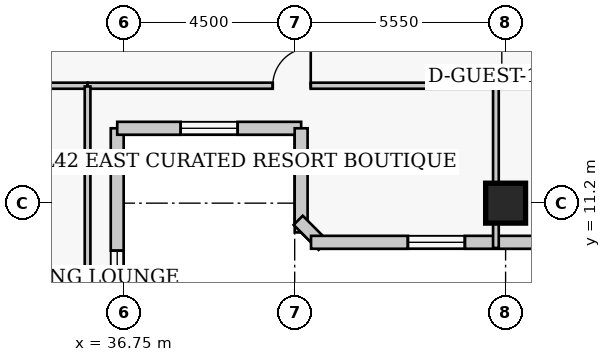
"""IFC4 building model, lengths in metres.
Left out: names, types, materials, properties, quantities, classifications, styles, units other than length and angle.
Written with IfcOpenShell. Run it as: python <this file> out.ifc"""

import sys

from ifc_helpers import new_model, si_unit, direction, frame, frame_2d, origin, origin_2d, place, context, subcontext, project, spatial, rectangle, extrude, element, fill, save


model = new_model("IFC4")
c1 = context("Model", 3, precision=1e-05, world=origin(), true_north=direction((0.0, 1.0)))
c2 = subcontext(c1, "Body", "Model", "MODEL_VIEW")
j1 = project(units=[si_unit("LENGTHUNIT", "METRE"), si_unit("PLANEANGLEUNIT", "RADIAN")], contexts=[c1])
p1 = place(None, origin())
s1 = spatial("IfcSite", under=j1, at=p1, CompositionType="ELEMENT")
p2 = place(p1, origin())
s2 = spatial("IfcBuilding", under=s1, at=p2, CompositionType="ELEMENT")
p3 = place(p2, frame((0.0, 0.0, 168.8)))
s3 = spatial("IfcBuildingStorey", under=s2, at=p3, CompositionType="ELEMENT", Elevation=168.8)
p4 = place(p3, frame((46.8, 11.2, 0.0), z_axis=(0.0, 0.0, 1.0), x_axis=(1.0, 0.0, 0.0)))
e1 = element("IfcColumn", 1, at=p4, inside=s3, PredefinedType="COLUMN", context=c2, shape_type="SweptSolid", body=[
    extrude(rectangle(XDim=1.05, YDim=1.05, at=origin_2d()), origin(), (0.0, 0.0, 1.0), 3.8),
])
p5 = place(p3, frame((36.58, 5.23, 0.0), z_axis=(0.0, 0.0, 1.0), x_axis=(0.0, 1.0, 0.0)))
e2 = element("IfcWall", 2, at=p5, inside=s3, PredefinedType="SOLIDWALL", context=c2, shape_type="SweptSolid", body=[
    extrude(rectangle(XDim=7.94, YDim=0.34, at=frame_2d((3.97, 0.0))), origin(), (0.0, 0.0, 1.0), 3.55),
])
p6 = place(p5, frame((3.22, 0.0, 0.85)))
e3 = element("IfcOpeningElement", 3, at=p6, cuts=e2, PredefinedType="OPENING", context=c2, shape_type="SweptSolid", body=[
    extrude(rectangle(XDim=1.5, YDim=1.75, at=frame_2d((0.75, 0.875))), frame((0.0, 0.18, 0.0), z_axis=(0.0, -1.0, 0.0), x_axis=(1.0, 0.0, 0.0)), (0.0, 0.0, 1.0), 0.36),
])
p7 = place(p3, frame((36.58, 13.17, 0.0), z_axis=(0.0, 0.0, 1.0), x_axis=(1.0, 0.0, 0.0)))
e4 = element("IfcWall", 4, at=p7, inside=s3, PredefinedType="SOLIDWALL", context=c2, shape_type="SweptSolid", body=[
    extrude(rectangle(XDim=4.84, YDim=0.34, at=frame_2d((2.42, 0.0))), origin(), (0.0, 0.0, 1.0), 3.55),
])
p8 = place(p7, frame((1.67, 0.0, 0.85)))
e5 = element("IfcOpeningElement", 5, at=p8, cuts=e4, PredefinedType="OPENING", context=c2, shape_type="SweptSolid", body=[
    extrude(rectangle(XDim=1.5, YDim=1.75, at=frame_2d((0.75, 0.875))), frame((0.0, 0.18, 0.0), z_axis=(0.0, -1.0, 0.0), x_axis=(1.0, 0.0, 0.0)), (0.0, 0.0, 1.0), 0.36),
])
p9 = place(p3, frame((41.42, 13.17, 0.0), z_axis=(0.0, 0.0, 1.0), x_axis=(0.0, -1.0, 0.0)))
e6 = element("IfcWall", 6, at=p9, inside=s3, PredefinedType="SOLIDWALL", context=c2, shape_type="SweptSolid", body=[
    extrude(rectangle(XDim=2.74, YDim=0.34, at=frame_2d((1.37, 0.0))), origin(), (0.0, 0.0, 1.0), 3.55),
])
p10 = place(p3, frame((41.342, 10.749, 0.0), z_axis=(0.0, 0.0, 1.0), x_axis=(0.707106781187, -0.707106781187, 0.0)))
e7 = element("IfcWall", 7, at=p10, inside=s3, PredefinedType="SOLIDWALL", context=c2, shape_type="SweptSolid", body=[
    extrude(rectangle(XDim=0.929, YDim=0.34, at=frame_2d((0.464, 0.0))), origin(), (0.0, 0.0, 1.0), 3.55),
])
p11 = place(p3, frame((41.68, 10.17, 0.0), z_axis=(0.0, 0.0, 1.0), x_axis=(1.0, 0.0, 0.0)))
e8 = element("IfcWall", 8, at=p11, inside=s3, PredefinedType="SOLIDWALL", context=c2, shape_type="SweptSolid", body=[
    extrude(rectangle(XDim=26.69, YDim=0.34, at=frame_2d((13.345, 0.0))), origin(), (0.0, 0.0, 1.0), 3.55),
])
p12 = place(p11, frame((2.548, 0.0, 0.85)))
e9 = element("IfcOpeningElement", 9, at=p12, cuts=e8, PredefinedType="OPENING", context=c2, shape_type="SweptSolid", body=[
    extrude(rectangle(XDim=1.5, YDim=1.75, at=frame_2d((0.75, 0.875))), frame((0.0, 0.18, 0.0), z_axis=(0.0, -1.0, 0.0), x_axis=(1.0, 0.0, 0.0)), (0.0, 0.0, 1.0), 0.36),
])
p13 = place(p11, frame((13.745, 0.0, 0.85)))
e10 = element("IfcOpeningElement", 10, at=p13, cuts=e8, PredefinedType="OPENING", context=c2, shape_type="SweptSolid", body=[
    extrude(rectangle(XDim=1.5, YDim=1.75, at=frame_2d((0.75, 0.875))), frame((0.0, 0.18, 0.0), z_axis=(0.0, -1.0, 0.0), x_axis=(1.0, 0.0, 0.0)), (0.0, 0.0, 1.0), 0.36),
])
p14 = place(p11, frame((21.492, 0.0, 0.85)))
e11 = element("IfcOpeningElement", 11, at=p14, cuts=e8, PredefinedType="OPENING", context=c2, shape_type="SweptSolid", body=[
    extrude(rectangle(XDim=1.5, YDim=1.75, at=frame_2d((0.75, 0.875))), frame((0.0, 0.18, 0.0), z_axis=(0.0, -1.0, 0.0), x_axis=(1.0, 0.0, 0.0)), (0.0, 0.0, 1.0), 0.36),
])
p15 = place(p3, frame((19.35, 14.29, 0.0), z_axis=(0.0, 0.0, 1.0), x_axis=(1.0, 0.0, 0.0)))
e12 = element("IfcWall", 12, at=p15, inside=s3, PredefinedType="PARTITIONING", context=c2, shape_type="SweptSolid", body=[
    extrude(rectangle(XDim=16.45, YDim=0.16, at=frame_2d((8.225, 0.0))), origin(), (0.0, 0.0, 1.0), 3.55),
])
p16 = place(p15, frame((3.24, 0.0, 0.0)))
e13 = element("IfcOpeningElement", 13, at=p16, cuts=e12, PredefinedType="OPENING", context=c2, shape_type="SweptSolid", body=[
    extrude(rectangle(XDim=1.0, YDim=2.15, at=frame_2d((0.5, 1.075))), frame((0.0, 0.09, 0.0), z_axis=(0.0, -1.0, 0.0), x_axis=(1.0, 0.0, 0.0)), (0.0, 0.0, 1.0), 0.18),
])
p17 = place(p15, frame((6.005, 0.0, 0.0)))
e14 = element("IfcOpeningElement", 14, at=p17, cuts=e12, PredefinedType="OPENING", context=c2, shape_type="SweptSolid", body=[
    extrude(rectangle(XDim=0.95, YDim=2.1, at=frame_2d((0.475, 1.05))), frame((0.0, 0.09, 0.0), z_axis=(0.0, -1.0, 0.0), x_axis=(1.0, 0.0, 0.0)), (0.0, 0.0, 1.0), 0.18),
])
p18 = place(p15, frame((12.805, 0.0, 0.0)))
e15 = element("IfcOpeningElement", 15, at=p18, cuts=e12, PredefinedType="OPENING", context=c2, shape_type="SweptSolid", body=[
    extrude(rectangle(XDim=1.0, YDim=2.15, at=frame_2d((0.5, 1.075))), frame((0.0, 0.09, 0.0), z_axis=(0.0, -1.0, 0.0), x_axis=(1.0, 0.0, 0.0)), (0.0, 0.0, 1.0), 0.18),
])
p19 = place(p3, frame((35.8, 14.29, 0.0), z_axis=(0.0, 0.0, 1.0), x_axis=(1.0, 0.0, 0.0)))
e16 = element("IfcWall", 16, at=p19, inside=s3, PredefinedType="PARTITIONING", context=c2, shape_type="SweptSolid", body=[
    extrude(rectangle(XDim=22.65, YDim=0.16, at=frame_2d((11.325, 0.0))), origin(), (0.0, 0.0, 1.0), 3.55),
])
p20 = place(p19, frame((4.873, 0.0, 0.0)))
e17 = element("IfcOpeningElement", 17, at=p20, cuts=e16, PredefinedType="OPENING", context=c2, shape_type="SweptSolid", body=[
    extrude(rectangle(XDim=1.0, YDim=2.15, at=frame_2d((0.5, 1.075))), frame((0.0, 0.09, 0.0), z_axis=(0.0, -1.0, 0.0), x_axis=(1.0, 0.0, 0.0)), (0.0, 0.0, 1.0), 0.18),
])
p21 = place(p3, frame((35.8, 4.82, 0.0), z_axis=(0.0, 0.0, 1.0), x_axis=(0.0, 1.0, 0.0)))
e18 = element("IfcWall", 18, at=p21, inside=s3, PredefinedType="PARTITIONING", context=c2, shape_type="SweptSolid", body=[
    extrude(rectangle(XDim=9.45, YDim=0.15, at=frame_2d((4.725, 0.0))), origin(), (0.0, 0.0, 1.0), 3.55),
])
p22 = place(p3, frame((46.545, 10.02, 0.0), z_axis=(0.0, 0.0, 1.0), x_axis=(0.0, 1.0, 0.0)))
e19 = element("IfcWall", 19, at=p22, inside=s3, PredefinedType="PARTITIONING", context=c2, shape_type="SweptSolid", body=[
    extrude(rectangle(XDim=4.27, YDim=0.15, at=frame_2d((2.135, 0.0))), origin(), (0.0, 0.0, 1.0), 2.9),
])
p23 = place(p6, origin())
e20 = element("IfcWindow", 20, at=p23, inside=s3, PartitioningType="SINGLE_PANEL", PredefinedType="WINDOW", context=c2, shape_type="SweptSolid", body=[
    extrude(rectangle(XDim=1.5, YDim=1.75, at=frame_2d((0.75, 0.875))), frame((0.0, 0.03, 0.0), z_axis=(0.0, -1.0, 0.0), x_axis=(1.0, 0.0, 0.0)), (0.0, 0.0, 1.0), 0.06),
])
fill(e3, e20)
p24 = place(p8, origin())
e21 = element("IfcWindow", 21, at=p24, inside=s3, PartitioningType="SINGLE_PANEL", PredefinedType="WINDOW", context=c2, shape_type="SweptSolid", body=[
    extrude(rectangle(XDim=1.5, YDim=1.75, at=frame_2d((0.75, 0.875))), frame((0.0, 0.03, 0.0), z_axis=(0.0, -1.0, 0.0), x_axis=(1.0, 0.0, 0.0)), (0.0, 0.0, 1.0), 0.06),
])
fill(e5, e21)
p25 = place(p12, origin())
e22 = element("IfcWindow", 22, at=p25, inside=s3, PartitioningType="SINGLE_PANEL", PredefinedType="WINDOW", context=c2, shape_type="SweptSolid", body=[
    extrude(rectangle(XDim=1.5, YDim=1.75, at=frame_2d((0.75, 0.875))), frame((0.0, 0.03, 0.0), z_axis=(0.0, -1.0, 0.0), x_axis=(1.0, 0.0, 0.0)), (0.0, 0.0, 1.0), 0.06),
])
fill(e9, e22)
p26 = place(p20, origin())
e23 = element("IfcDoor", 23, at=p26, inside=s3, OperationType="SINGLE_SWING_RIGHT", PredefinedType="DOOR", context=c2, shape_type="SweptSolid", body=[
    extrude(rectangle(XDim=1.0, YDim=2.15, at=frame_2d((0.5, 1.075))), frame((0.0, 0.025, 0.0), z_axis=(0.0, -1.0, 0.0), x_axis=(1.0, 0.0, 0.0)), (0.0, 0.0, 1.0), 0.05),
])
fill(e17, e23)
save(model, sys.argv[1])
